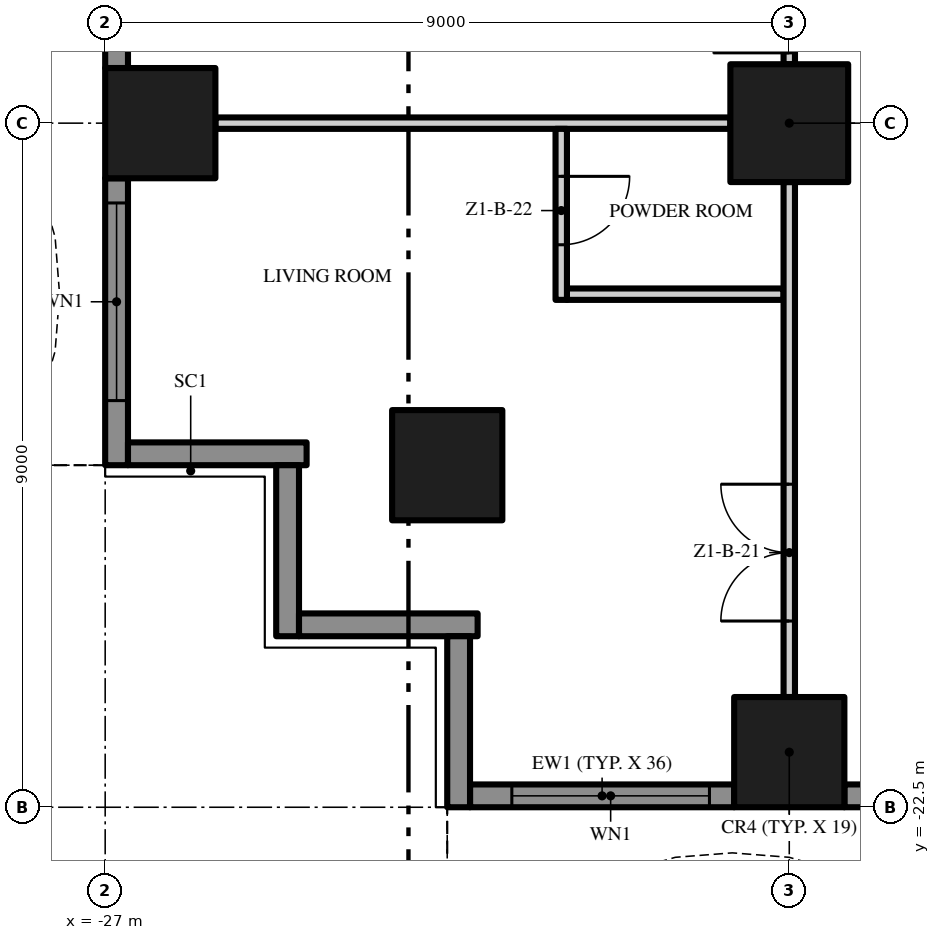
"""IFC4 building model, lengths in metres.
Left out: names, types, materials, properties, quantities, classifications, styles, units other than length and angle.
Written with IfcOpenShell. Run it as: python <this file> out.ifc"""

import sys

from ifc_helpers import new_model, si_unit, direction, frame, frame_2d, origin, origin_2d, place, context, subcontext, project, spatial, polyline, rectangle, outline, extrude, element, fill, save


model = new_model("IFC4")
c1 = context("Model", 3, precision=1e-05, world=origin(), true_north=direction((0.0, 1.0)))
c2 = subcontext(c1, "Body", "Model", "MODEL_VIEW")
j1 = project(units=[si_unit("LENGTHUNIT", "METRE"), si_unit("PLANEANGLEUNIT", "RADIAN")], contexts=[c1])
p1 = place(None, origin())
s1 = spatial("IfcSite", under=j1, at=p1, CompositionType="ELEMENT")
p2 = place(p1, origin())
s2 = spatial("IfcBuilding", under=s1, at=p2, CompositionType="ELEMENT")
p3 = place(p2, frame((0.0, 0.0, 30.2)))
s3 = spatial("IfcBuildingStorey", under=s2, at=p3, CompositionType="ELEMENT", Elevation=30.2)
p4 = place(p3, frame((-18.0, -13.5, 0.0), z_axis=(0.0, 0.0, 1.0), x_axis=(1.0, 0.0, 0.0)))
e1 = element("IfcColumn", 1, at=p4, inside=s3, PredefinedType="COLUMN", context=c2, shape_type="SweptSolid", body=[
    extrude(rectangle(XDim=1.55, YDim=1.55, at=origin_2d()), origin(), (0.0, 0.0, 1.0), 3.5),
])
for number, where, z_axis, x_axis in (
    (2, (-18.0, -21.775, 0.0), (0.0, 0.0, 1.0), (1.0, 0.0, 0.0)),
    (3, (-26.275, -13.5, 0.0), (0.0, 0.0, 1.0), (1.0, 0.0, 0.0)),
    (4, (-22.5, -18.0, 0.0), (0.0, 0.0, 1.0), (1.0, 0.0, 0.0)),
):
    element("IfcColumn", number, at=place(p3, frame(where, z_axis=z_axis, x_axis=x_axis)), inside=s3, PredefinedType="COLUMN", context=c2, shape_type="SweptSolid", body=[
        extrude(rectangle(XDim=1.45, YDim=1.45, at=origin_2d()), origin(), (0.0, 0.0, 1.0), 3.5),
    ])
p5 = place(p3, frame((-18.725, -22.35, 0.0), z_axis=(0.0, 0.0, 1.0), x_axis=(-1.0, 0.0, 0.0)))
e5 = element("IfcWall", 5, at=p5, inside=s3, PredefinedType="SOLIDWALL", context=c2, shape_type="SweptSolid", body=[
    extrude(rectangle(XDim=3.475, YDim=0.3, at=frame_2d((1.738, 0.0))), origin(), (0.0, 0.0, 1.0), 3.5),
])
p6 = place(p5, frame((0.325, 0.0, 0.45)))
e6 = element("IfcOpeningElement", 6, at=p6, cuts=e5, PredefinedType="OPENING", context=c2, shape_type="SweptSolid", body=[
    extrude(rectangle(XDim=2.6, YDim=2.65, at=frame_2d((1.3, 1.325))), frame((0.0, 0.16, 0.0), z_axis=(0.0, -1.0, 0.0), x_axis=(1.0, 0.0, 0.0)), (0.0, 0.0, 1.0), 0.32),
])
p7 = place(p3, frame((-9.725, -22.35, 0.0), z_axis=(0.0, 0.0, 1.0), x_axis=(-1.0, 0.0, 0.0)))
e7 = element("IfcWall", 7, at=p7, inside=s3, PredefinedType="SOLIDWALL", context=c2, shape_type="SweptSolid", body=[
    extrude(rectangle(XDim=7.55, YDim=0.3, at=frame_2d((3.775, 0.0))), origin(), (0.0, 0.0, 1.0), 3.5),
])
p8 = place(p7, frame((4.625, 0.0, 0.45)))
e8 = element("IfcOpeningElement", 8, at=p8, cuts=e7, PredefinedType="OPENING", context=c2, shape_type="SweptSolid", body=[
    extrude(rectangle(XDim=2.6, YDim=2.65, at=frame_2d((1.3, 1.325))), frame((0.0, 0.16, 0.0), z_axis=(0.0, -1.0, 0.0), x_axis=(1.0, 0.0, 0.0)), (0.0, 0.0, 1.0), 0.32),
])
p9 = place(p7, frame((0.325, 0.0, 0.0)))
e9 = element("IfcOpeningElement", 9, at=p9, cuts=e7, PredefinedType="OPENING", context=c2, shape_type="SweptSolid", body=[
    extrude(rectangle(XDim=2.6, YDim=2.4, at=frame_2d((1.3, 1.2))), frame((0.0, 0.16, 0.0), z_axis=(0.0, -1.0, 0.0), x_axis=(1.0, 0.0, 0.0)), (0.0, 0.0, 1.0), 0.32),
])
p10 = place(p3, frame((-26.85, -12.775, 0.0), z_axis=(0.0, 0.0, 1.0), x_axis=(0.0, 1.0, 0.0)))
e10 = element("IfcWall", 10, at=p10, inside=s3, PredefinedType="SOLIDWALL", context=c2, shape_type="SweptSolid", body=[
    extrude(rectangle(XDim=7.55, YDim=0.3, at=frame_2d((3.775, 0.0))), origin(), (0.0, 0.0, 1.0), 3.5),
])
p11 = place(p10, frame((4.625, 0.0, 0.0)))
e11 = element("IfcOpeningElement", 11, at=p11, cuts=e10, PredefinedType="OPENING", context=c2, shape_type="SweptSolid", body=[
    extrude(rectangle(XDim=2.6, YDim=2.4, at=frame_2d((1.3, 1.2))), frame((0.0, 0.16, 0.0), z_axis=(0.0, -1.0, 0.0), x_axis=(1.0, 0.0, 0.0)), (0.0, 0.0, 1.0), 0.32),
])
p12 = place(p10, frame((0.325, 0.0, 0.45)))
e12 = element("IfcOpeningElement", 12, at=p12, cuts=e10, PredefinedType="OPENING", context=c2, shape_type="SweptSolid", body=[
    extrude(rectangle(XDim=2.6, YDim=2.65, at=frame_2d((1.3, 1.325))), frame((0.0, 0.16, 0.0), z_axis=(0.0, -1.0, 0.0), x_axis=(1.0, 0.0, 0.0)), (0.0, 0.0, 1.0), 0.32),
])
p13 = place(p3, frame((-26.85, -18.0, 0.0), z_axis=(0.0, 0.0, 1.0), x_axis=(0.0, 1.0, 0.0)))
e13 = element("IfcWall", 13, at=p13, inside=s3, PredefinedType="SOLIDWALL", context=c2, shape_type="SweptSolid", body=[
    extrude(rectangle(XDim=3.775, YDim=0.3, at=frame_2d((1.887, 0.0))), origin(), (0.0, 0.0, 1.0), 3.5),
])
p14 = place(p13, frame((0.85, 0.0, 0.45)))
e14 = element("IfcOpeningElement", 14, at=p14, cuts=e13, PredefinedType="OPENING", context=c2, shape_type="SweptSolid", body=[
    extrude(rectangle(XDim=2.6, YDim=2.65, at=frame_2d((1.3, 1.325))), frame((0.0, 0.16, 0.0), z_axis=(0.0, -1.0, 0.0), x_axis=(1.0, 0.0, 0.0)), (0.0, 0.0, 1.0), 0.32),
])
p15 = place(p3, frame((-24.35, -17.85, 0.0), z_axis=(0.0, 0.0, 1.0), x_axis=(-1.0, 0.0, 0.0)))
e15 = element("IfcWall", 15, at=p15, inside=s3, PredefinedType="SOLIDWALL", context=c2, shape_type="SweptSolid", body=[
    extrude(rectangle(XDim=2.35, YDim=0.3, at=frame_2d((1.175, 0.0))), origin(), (0.0, 0.0, 1.0), 3.5),
])
p16 = place(p3, frame((-24.6, -20.25, 0.0), z_axis=(0.0, 0.0, 1.0), x_axis=(0.0, 1.0, 0.0)))
e16 = element("IfcWall", 16, at=p16, inside=s3, PredefinedType="SOLIDWALL", context=c2, shape_type="SweptSolid", body=[
    extrude(rectangle(XDim=2.25, YDim=0.3, at=frame_2d((1.125, 0.0))), origin(), (0.0, 0.0, 1.0), 3.5),
])
p17 = place(p3, frame((-22.1, -20.1, 0.0), z_axis=(0.0, 0.0, 1.0), x_axis=(-1.0, 0.0, 0.0)))
e17 = element("IfcWall", 17, at=p17, inside=s3, PredefinedType="SOLIDWALL", context=c2, shape_type="SweptSolid", body=[
    extrude(rectangle(XDim=2.35, YDim=0.3, at=frame_2d((1.175, 0.0))), origin(), (0.0, 0.0, 1.0), 3.5),
])
p18 = place(p3, frame((-22.35, -22.5, 0.0), z_axis=(0.0, 0.0, 1.0), x_axis=(0.0, 1.0, 0.0)))
e18 = element("IfcWall", 18, at=p18, inside=s3, PredefinedType="SOLIDWALL", context=c2, shape_type="SweptSolid", body=[
    extrude(rectangle(XDim=2.25, YDim=0.3, at=frame_2d((1.125, 0.0))), origin(), (0.0, 0.0, 1.0), 3.5),
])
p19 = place(p3, origin())
e19 = element("IfcWall", 19, at=p19, inside=s3, PredefinedType="USERDEFINED", context=c2, shape_type="SweptSolid", body=[
    extrude(outline(polyline([(-22.5, -24.3), (-21.0, -23.595), (-19.5, -23.159), (-18.75, -23.1), (-18.0, -23.159), (-16.5, -23.595), (-15.0, -24.3), (-13.5, -25.005), (-12.0, -25.441), (-11.25, -25.5), (-10.5, -25.441), (-9.0, -25.005), (-7.5, -24.3), (-6.0, -23.595), (-4.5, -23.159), (-3.75, -23.1), (-3.0, -23.159), (-1.5, -23.595), (0.0, -24.3), (1.5, -25.005), (3.0, -25.441), (3.75, -25.5), (4.5, -25.441), (6.0, -25.005), (7.5, -24.3), (9.0, -23.595), (10.5, -23.159), (11.25, -23.1), (12.0, -23.159), (13.5, -23.595), (15.0, -24.3), (16.5, -25.005), (18.0, -25.441), (18.75, -25.5), (19.5, -25.441), (21.0, -25.005), (22.5, -24.3), (22.394, -24.074), (20.911, -24.771), (19.455, -25.194), (18.75, -25.249), (18.045, -25.194), (16.589, -24.771), (15.106, -24.074), (13.589, -23.36), (12.045, -22.911), (11.25, -22.849), (10.455, -22.911), (8.911, -23.36), (7.394, -24.074), (5.911, -24.771), (4.455, -25.194), (3.75, -25.249), (3.045, -25.194), (1.589, -24.771), (0.106, -24.074), (-1.411, -23.36), (-2.955, -22.911), (-3.75, -22.849), (-4.545, -22.911), (-6.089, -23.36), (-7.606, -24.074), (-9.089, -24.771), (-10.545, -25.194), (-11.25, -25.249), (-11.955, -25.194), (-13.411, -24.771), (-14.894, -24.074), (-16.411, -23.36), (-17.955, -22.911), (-18.75, -22.849), (-19.545, -22.911), (-21.089, -23.36), (-22.606, -24.074), (-22.5, -24.3)])), origin(), (0.0, 0.0, 1.0), 0.9),
])
p20 = place(p3, origin())
e20 = element("IfcWall", 20, at=p20, inside=s3, PredefinedType="USERDEFINED", context=c2, shape_type="SweptSolid", body=[
    extrude(outline(polyline([(-28.8, 18.0), (-28.095, 16.5), (-27.659, 15.0), (-27.6, 14.25), (-27.659, 13.5), (-28.095, 12.0), (-28.8, 10.5), (-29.505, 9.0), (-29.941, 7.5), (-30.0, 6.75), (-29.941, 6.0), (-29.505, 4.5), (-28.8, 3.0), (-28.095, 1.5), (-27.659, 0.0), (-27.6, -0.75), (-27.659, -1.5), (-28.095, -3.0), (-28.8, -4.5), (-29.505, -6.0), (-29.941, -7.5), (-30.0, -8.25), (-29.941, -9.0), (-29.505, -10.5), (-28.8, -12.0), (-28.095, -13.5), (-27.659, -15.0), (-27.6, -15.75), (-27.659, -16.5), (-28.095, -18.0), (-27.855, -18.07), (-27.411, -16.545), (-27.349, -15.75), (-27.411, -14.955), (-27.86, -13.411), (-28.574, -11.894), (-29.271, -10.411), (-29.694, -8.955), (-29.749, -8.25), (-29.694, -7.545), (-29.271, -6.089), (-28.574, -4.606), (-27.86, -3.089), (-27.411, -1.545), (-27.349, -0.75), (-27.411, 0.045), (-27.86, 1.589), (-28.574, 3.106), (-29.271, 4.589), (-29.694, 6.045), (-29.749, 6.75), (-29.694, 7.455), (-29.271, 8.911), (-28.574, 10.394), (-27.86, 11.911), (-27.411, 13.455), (-27.349, 14.25), (-27.411, 15.045), (-27.86, 16.589), (-28.574, 18.106), (-28.8, 18.0)])), origin(), (0.0, 0.0, 1.0), 0.9),
])
p21 = place(p3, frame((-20.925, -15.75, 0.0), z_axis=(0.0, 0.0, 1.0), x_axis=(1.0, 0.0, 0.0)))
e21 = element("IfcWall", 21, at=p21, inside=s3, PredefinedType="PARTITIONING", context=c2, shape_type="SweptSolid", body=[
    extrude(rectangle(XDim=2.85, YDim=0.15, at=frame_2d((1.425, 0.0))), origin(), (0.0, 0.0, 1.0), 3.5),
])
p22 = place(p3, frame((-25.55, -13.5, 0.0), z_axis=(0.0, 0.0, 1.0), x_axis=(1.0, 0.0, 0.0)))
e22 = element("IfcWall", 22, at=p22, inside=s3, PredefinedType="PARTITIONING", context=c2, shape_type="SweptSolid", body=[
    extrude(rectangle(XDim=6.775, YDim=0.15, at=frame_2d((3.388, 0.0))), origin(), (0.0, 0.0, 1.0), 3.5),
])
p23 = place(p3, frame((-21.0, -13.575, 0.0), z_axis=(0.0, 0.0, 1.0), x_axis=(0.0, -1.0, 0.0)))
e23 = element("IfcWall", 23, at=p23, inside=s3, PredefinedType="PARTITIONING", context=c2, shape_type="SweptSolid", body=[
    extrude(rectangle(XDim=2.25, YDim=0.15, at=frame_2d((1.125, 0.0))), origin(), (0.0, 0.0, 1.0), 3.5),
])
p24 = place(p23, frame((0.625, 0.0, 0.0)))
e24 = element("IfcOpeningElement", 24, at=p24, cuts=e23, PredefinedType="OPENING", context=c2, shape_type="SweptSolid", body=[
    extrude(rectangle(XDim=0.9, YDim=2.1, at=frame_2d((0.45, 1.05))), frame((0.0, 0.085, 0.0), z_axis=(0.0, -1.0, 0.0), x_axis=(1.0, 0.0, 0.0)), (0.0, 0.0, 1.0), 0.17),
])
p25 = place(p3, frame((-18.0, -21.05, 0.0), z_axis=(0.0, 0.0, 1.0), x_axis=(0.0, 1.0, 0.0)))
e25 = element("IfcWall", 25, at=p25, inside=s3, PredefinedType="PARTITIONING", context=c2, shape_type="SweptSolid", body=[
    extrude(rectangle(XDim=6.775, YDim=0.15, at=frame_2d((3.388, 0.0))), origin(), (0.0, 0.0, 1.0), 3.5),
])
p26 = place(p25, frame((1.0, 0.0, 0.0)))
e26 = element("IfcOpeningElement", 26, at=p26, cuts=e25, PredefinedType="OPENING", context=c2, shape_type="SweptSolid", body=[
    extrude(rectangle(XDim=1.8, YDim=2.4, at=frame_2d((0.9, 1.2))), frame((0.0, 0.085, 0.0), z_axis=(0.0, -1.0, 0.0), x_axis=(1.0, 0.0, 0.0)), (0.0, 0.0, 1.0), 0.17),
])
p27 = place(p3, frame((-18.0, -12.725, 0.0), z_axis=(0.0, 0.0, 1.0), x_axis=(0.0, 1.0, 0.0)))
e27 = element("IfcWall", 27, at=p27, inside=s3, PredefinedType="PARTITIONING", context=c2, shape_type="SweptSolid", body=[
    extrude(rectangle(XDim=7.45, YDim=0.15, at=frame_2d((3.725, 0.0))), origin(), (0.0, 0.0, 1.0), 3.5),
])
p28 = place(p27, frame((0.15, 0.0, 0.0)))
e28 = element("IfcOpeningElement", 28, at=p28, cuts=e27, PredefinedType="OPENING", context=c2, shape_type="SweptSolid", body=[
    extrude(rectangle(XDim=1.0, YDim=2.4, at=frame_2d((0.5, 1.2))), frame((0.0, 0.085, 0.0), z_axis=(0.0, -1.0, 0.0), x_axis=(1.0, 0.0, 0.0)), (0.0, 0.0, 1.0), 0.17),
])
p29 = place(p27, frame((6.3, 0.0, 0.0)))
e29 = element("IfcOpeningElement", 29, at=p29, cuts=e27, PredefinedType="OPENING", context=c2, shape_type="SweptSolid", body=[
    extrude(rectangle(XDim=1.0, YDim=2.4, at=frame_2d((0.5, 1.2))), frame((0.0, 0.085, 0.0), z_axis=(0.0, -1.0, 0.0), x_axis=(1.0, 0.0, 0.0)), (0.0, 0.0, 1.0), 0.17),
])
p30 = place(p6, origin())
e30 = element("IfcWindow", 30, at=p30, inside=s3, PartitioningType="SINGLE_PANEL", PredefinedType="WINDOW", context=c2, shape_type="SweptSolid", body=[
    extrude(rectangle(XDim=2.6, YDim=2.65, at=frame_2d((1.3, 1.325))), frame((0.0, 0.03, 0.0), z_axis=(0.0, -1.0, 0.0), x_axis=(1.0, 0.0, 0.0)), (0.0, 0.0, 1.0), 0.06),
])
fill(e6, e30)
p31 = place(p14, origin())
e31 = element("IfcWindow", 31, at=p31, inside=s3, PartitioningType="SINGLE_PANEL", PredefinedType="WINDOW", context=c2, shape_type="SweptSolid", body=[
    extrude(rectangle(XDim=2.6, YDim=2.65, at=frame_2d((1.3, 1.325))), frame((0.0, 0.03, 0.0), z_axis=(0.0, -1.0, 0.0), x_axis=(1.0, 0.0, 0.0)), (0.0, 0.0, 1.0), 0.06),
])
fill(e14, e31)
p32 = place(p26, origin())
e32 = element("IfcDoor", 32, at=p32, inside=s3, OperationType="DOUBLE_DOOR_SINGLE_SWING", PredefinedType="DOOR", context=c2, shape_type="SweptSolid", body=[
    extrude(rectangle(XDim=1.8, YDim=2.4, at=frame_2d((0.9, 1.2))), frame((0.0, 0.025, 0.0), z_axis=(0.0, -1.0, 0.0), x_axis=(1.0, 0.0, 0.0)), (0.0, 0.0, 1.0), 0.05),
])
fill(e26, e32)
p33 = place(p24, origin())
e33 = element("IfcDoor", 33, at=p33, inside=s3, OperationType="SINGLE_SWING_LEFT", PredefinedType="DOOR", context=c2, shape_type="SweptSolid", body=[
    extrude(rectangle(XDim=0.9, YDim=2.1, at=frame_2d((0.45, 1.05))), frame((0.0, 0.025, 0.0), z_axis=(0.0, -1.0, 0.0), x_axis=(1.0, 0.0, 0.0)), (0.0, 0.0, 1.0), 0.05),
])
fill(e24, e33)
save(model, sys.argv[1])
